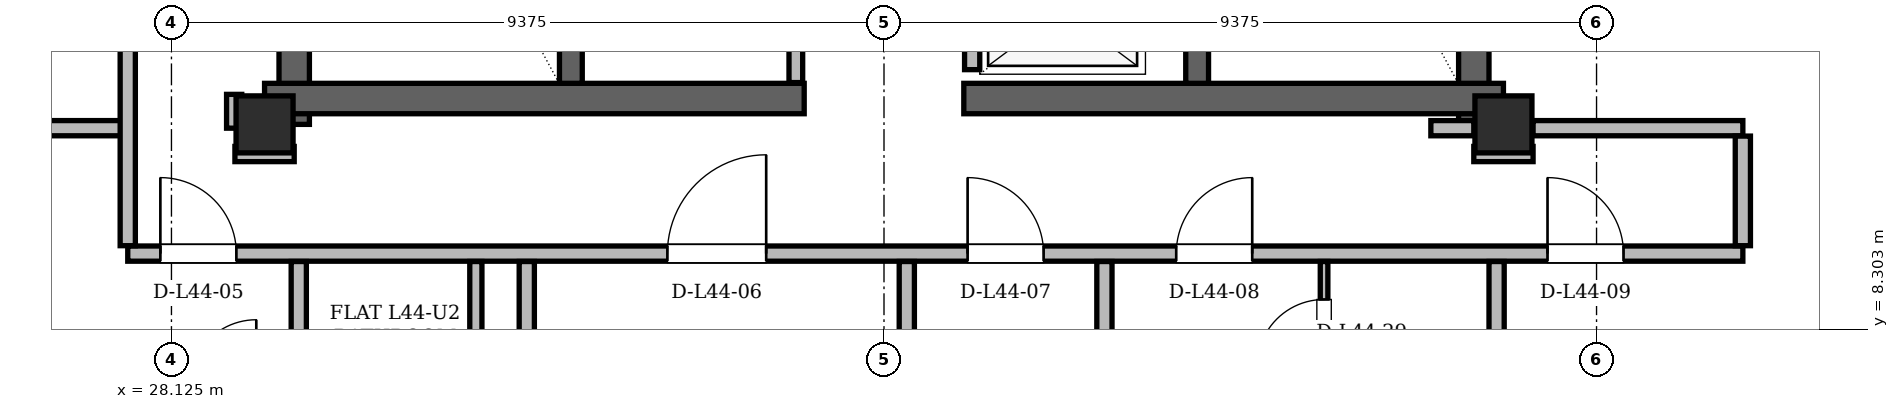
"""IFC4 building model, lengths in metres.
Left out: names, types, materials, properties, quantities, classifications, styles, units other than length and angle.
Written with IfcOpenShell. Run it as: python <this file> out.ifc"""

import sys

from ifc_helpers import new_model, si_unit, direction, frame, frame_2d, origin, origin_2d, place, context, subcontext, project, spatial, rectangle, hollow_rectangle, extrude, element, fill, save


model = new_model("IFC4")
c1 = context("Model", 3, precision=1e-05, world=origin(), true_north=direction((0.0, 1.0)))
c2 = subcontext(c1, "Body", "Model", "MODEL_VIEW")
j1 = project(units=[si_unit("LENGTHUNIT", "METRE"), si_unit("PLANEANGLEUNIT", "RADIAN")], contexts=[c1])
p1 = place(None, origin())
s1 = spatial("IfcSite", under=j1, at=p1, CompositionType="ELEMENT")
p2 = place(p1, origin())
s2 = spatial("IfcBuilding", under=s1, at=p2, CompositionType="ELEMENT")
p3 = place(p2, frame((0.0, 0.0, 167.4)))
s3 = spatial("IfcBuildingStorey", under=s2, at=p3, CompositionType="ELEMENT", Elevation=167.4)
for number, where, z_axis, x_axis in (
    (1, (29.35, 11.0, 0.0), (0.0, 0.0, 1.0), (1.0, 0.0, 0.0)),
    (2, (45.65, 11.0, 0.0), (0.0, 0.0, 1.0), (1.0, 0.0, 0.0)),
):
    element("IfcColumn", number, at=place(p3, frame(where, z_axis=z_axis, x_axis=x_axis)), inside=s3, PredefinedType="COLUMN", context=c2, shape_type="SweptSolid", body=[
        extrude(hollow_rectangle(XDim=0.75, YDim=0.75, WallThickness=0.06, at=origin_2d()), origin(), (0.0, 0.0, 1.0), 3.6),
    ])
for number, where, z_axis, x_axis in (
    (3, (29.74, 11.0, 0.0), (0.0, 0.0, 1.0), (0.0, 1.0, 0.0)),
    (4, (45.26, 11.0, 0.0), (0.0, 0.0, 1.0), (0.0, 1.0, 0.0)),
):
    element("IfcWall", number, at=place(p3, frame(where, z_axis=z_axis, x_axis=x_axis)), inside=s3, PredefinedType="SHEAR", context=c2, shape_type="SweptSolid", body=[
        extrude(rectangle(XDim=13.3, YDim=0.4, at=frame_2d((6.65, 0.0))), origin(), (0.0, 0.0, 1.0), 3.38),
    ])
for number, where, z_axis, x_axis in (
    (5, (29.35, 11.34, 0.0), (0.0, 0.0, 1.0), (1.0, 0.0, 0.0)),
    (6, (38.55, 11.34, 0.0), (0.0, 0.0, 1.0), (1.0, 0.0, 0.0)),
):
    element("IfcWall", number, at=place(p3, frame(where, z_axis=z_axis, x_axis=x_axis)), inside=s3, PredefinedType="SHEAR", context=c2, shape_type="SweptSolid", body=[
        extrude(rectangle(XDim=7.1, YDim=0.4, at=frame_2d((3.55, 0.0))), origin(), (0.0, 0.0, 1.0), 3.38),
    ])
for number, where, z_axis, x_axis in (
    (7, (33.38, 11.54, 0.0), (0.0, 0.0, 1.0), (0.0, 1.0, 0.0)),
    (8, (41.62, 11.54, 0.0), (0.0, 0.0, 1.0), (0.0, 1.0, 0.0)),
):
    element("IfcWall", number, at=place(p3, frame(where, z_axis=z_axis, x_axis=x_axis)), inside=s3, PredefinedType="SHEAR", context=c2, shape_type="SweptSolid", body=[
        extrude(rectangle(XDim=7.62, YDim=0.3, at=frame_2d((3.81, 0.0))), origin(), (0.0, 0.0, 1.0), 3.38),
    ])
p4 = place(p3, frame((36.34, 11.55, 0.0), z_axis=(0.0, 0.0, 1.0), x_axis=(0.0, 1.0, 0.0)))
e9 = element("IfcWall", 9, at=p4, inside=s3, PredefinedType="PARTITIONING", context=c2, shape_type="SweptSolid", body=[
    extrude(rectangle(XDim=5.55, YDim=0.18, at=frame_2d((2.775, 0.0))), origin(), (0.0, 0.0, 1.0), 3.38),
])
p5 = place(p4, frame((2.85, 0.0, 0.0)))
e10 = element("IfcOpeningElement", 10, at=p5, cuts=e9, PredefinedType="OPENING", context=c2, shape_type="SweptSolid", body=[
    extrude(rectangle(XDim=0.95, YDim=2.1, at=frame_2d((0.475, 1.05))), frame((0.0, 0.09, 0.0), z_axis=(0.0, -1.0, 0.0), x_axis=(1.0, 0.0, 0.0)), (0.0, 0.0, 1.0), 0.18),
])
p6 = place(p3, frame((38.66, 11.72, 0.0), z_axis=(0.0, 0.0, 1.0), x_axis=(0.0, 1.0, 0.0)))
e11 = element("IfcWall", 11, at=p6, inside=s3, PredefinedType="PARTITIONING", context=c2, shape_type="SweptSolid", body=[
    extrude(rectangle(XDim=9.1, YDim=0.2, at=frame_2d((4.55, 0.0))), origin(), (0.0, 0.0, 1.0), 3.38),
])
p7 = place(p6, frame((0.255, 0.0, 0.0)))
e12 = element("IfcOpeningElement", 12, at=p7, cuts=e11, PredefinedType="OPENING", context=c2, shape_type="SweptSolid", body=[
    extrude(rectangle(XDim=1.05, YDim=2.15, at=frame_2d((0.525, 1.075))), frame((0.0, 0.1, 0.0), z_axis=(0.0, -1.0, 0.0), x_axis=(1.0, 0.0, 0.0)), (0.0, 0.0, 1.0), 0.2),
])
p8 = place(p6, frame((2.105, 0.0, 0.0)))
e13 = element("IfcOpeningElement", 13, at=p8, cuts=e11, PredefinedType="OPENING", context=c2, shape_type="SweptSolid", body=[
    extrude(rectangle(XDim=1.05, YDim=2.15, at=frame_2d((0.525, 1.075))), frame((0.0, 0.1, 0.0), z_axis=(0.0, -1.0, 0.0), x_axis=(1.0, 0.0, 0.0)), (0.0, 0.0, 1.0), 0.2),
])
p9 = place(p6, frame((3.955, 0.0, 0.0)))
e14 = element("IfcOpeningElement", 14, at=p9, cuts=e11, PredefinedType="OPENING", context=c2, shape_type="SweptSolid", body=[
    extrude(rectangle(XDim=1.05, YDim=2.15, at=frame_2d((0.525, 1.075))), frame((0.0, 0.1, 0.0), z_axis=(0.0, -1.0, 0.0), x_axis=(1.0, 0.0, 0.0)), (0.0, 0.0, 1.0), 0.2),
])
p10 = place(p3, frame((27.55, 9.3, 0.0), z_axis=(0.0, 0.0, 1.0), x_axis=(1.0, 0.0, 0.0)))
e15 = element("IfcWall", 15, at=p10, inside=s3, PredefinedType="PARTITIONING", context=c2, shape_type="SweptSolid", body=[
    extrude(rectangle(XDim=21.25, YDim=0.2, at=frame_2d((10.625, 0.0))), origin(), (0.0, 0.0, 1.0), 2.842),
])
p11 = place(p10, frame((0.429, 0.0, 0.0)))
e16 = element("IfcOpeningElement", 16, at=p11, cuts=e15, PredefinedType="OPENING", context=c2, shape_type="SweptSolid", body=[
    extrude(rectangle(XDim=1.0, YDim=2.18, at=frame_2d((0.5, 1.09))), frame((0.0, 0.1, 0.0), z_axis=(0.0, -1.0, 0.0), x_axis=(1.0, 0.0, 0.0)), (0.0, 0.0, 1.0), 0.2),
])
p12 = place(p10, frame((7.1, 0.0, 0.0)))
e17 = element("IfcOpeningElement", 17, at=p12, cuts=e15, PredefinedType="OPENING", context=c2, shape_type="SweptSolid", body=[
    extrude(rectangle(XDim=1.3, YDim=2.2, at=frame_2d((0.65, 1.1))), frame((0.0, 0.1, 0.0), z_axis=(0.0, -1.0, 0.0), x_axis=(1.0, 0.0, 0.0)), (0.0, 0.0, 1.0), 0.2),
])
p13 = place(p10, frame((11.05, 0.0, 0.0)))
e18 = element("IfcOpeningElement", 18, at=p13, cuts=e15, PredefinedType="OPENING", context=c2, shape_type="SweptSolid", body=[
    extrude(rectangle(XDim=1.0, YDim=2.18, at=frame_2d((0.5, 1.09))), frame((0.0, 0.1, 0.0), z_axis=(0.0, -1.0, 0.0), x_axis=(1.0, 0.0, 0.0)), (0.0, 0.0, 1.0), 0.2),
])
p14 = place(p10, frame((13.795, 0.0, 0.0)))
e19 = element("IfcOpeningElement", 19, at=p14, cuts=e15, PredefinedType="OPENING", context=c2, shape_type="SweptSolid", body=[
    extrude(rectangle(XDim=1.0, YDim=2.18, at=frame_2d((0.5, 1.09))), frame((0.0, 0.1, 0.0), z_axis=(0.0, -1.0, 0.0), x_axis=(1.0, 0.0, 0.0)), (0.0, 0.0, 1.0), 0.2),
])
p15 = place(p10, frame((18.68, 0.0, 0.0)))
e20 = element("IfcOpeningElement", 20, at=p15, cuts=e15, PredefinedType="OPENING", context=c2, shape_type="SweptSolid", body=[
    extrude(rectangle(XDim=1.0, YDim=2.18, at=frame_2d((0.5, 1.09))), frame((0.0, 0.1, 0.0), z_axis=(0.0, -1.0, 0.0), x_axis=(1.0, 0.0, 0.0)), (0.0, 0.0, 1.0), 0.2),
])
for number, where, z_axis, x_axis in (
    (21, (28.96, 10.61, 0.0), (0.0, 0.0, 1.0), (1.0, 0.0, 0.0)),
    (22, (45.26, 10.61, 0.0), (0.0, 0.0, 1.0), (1.0, 0.0, 0.0)),
):
    element("IfcWall", number, at=place(p3, frame(where, z_axis=z_axis, x_axis=x_axis)), inside=s3, PredefinedType="PARTITIONING", context=c2, shape_type="SweptSolid", body=[
        extrude(rectangle(XDim=0.78, YDim=0.2, at=frame_2d((0.39, 0.0))), origin(), (0.0, 0.0, 1.0), 3.38),
    ])
p16 = place(p3, frame((16.184, 10.95, 0.0), z_axis=(0.0, 0.0, 1.0), x_axis=(1.0, 0.0, 0.0)))
e23 = element("IfcWall", 23, at=p16, inside=s3, PredefinedType="PARTITIONING", context=c2, shape_type="SweptSolid", body=[
    extrude(rectangle(XDim=11.366, YDim=0.2, at=frame_2d((5.683, 0.0))), origin(), (0.0, 0.0, 1.0), 3.38),
])
p17 = place(p3, frame((44.695, 10.95, 0.0), z_axis=(0.0, 0.0, 1.0), x_axis=(1.0, 0.0, 0.0)))
e24 = element("IfcWall", 24, at=p17, inside=s3, PredefinedType="PARTITIONING", context=c2, shape_type="SweptSolid", body=[
    extrude(rectangle(XDim=0.565, YDim=0.2, at=frame_2d((0.282, 0.0))), origin(), (0.0, 0.0, 1.0), 2.52),
])
p18 = place(p3, frame((46.04, 10.95, 0.0), z_axis=(0.0, 0.0, 1.0), x_axis=(1.0, 0.0, 0.0)))
e25 = element("IfcWall", 25, at=p18, inside=s3, PredefinedType="PARTITIONING", context=c2, shape_type="SweptSolid", body=[
    extrude(rectangle(XDim=2.76, YDim=0.2, at=frame_2d((1.38, 0.0))), origin(), (0.0, 0.0, 1.0), 2.842),
])
p19 = place(p3, frame((27.55, 9.404, 0.0), z_axis=(0.0, 0.0, 1.0), x_axis=(0.0, 1.0, 0.0)))
e26 = element("IfcWall", 26, at=p19, inside=s3, PredefinedType="PARTITIONING", context=c2, shape_type="SweptSolid", body=[
    extrude(rectangle(XDim=7.342, YDim=0.2, at=frame_2d((3.671, 0.0))), origin(), (0.0, 0.0, 1.0), 2.842),
])
p20 = place(p19, frame((2.719, 0.0, 0.0)))
e27 = element("IfcOpeningElement", 27, at=p20, cuts=e26, PredefinedType="OPENING", context=c2, shape_type="SweptSolid", body=[
    extrude(rectangle(XDim=1.0, YDim=2.18, at=frame_2d((0.5, 1.09))), frame((0.0, 0.1, 0.0), z_axis=(0.0, -1.0, 0.0), x_axis=(1.0, 0.0, 0.0)), (0.0, 0.0, 1.0), 0.2),
])
p21 = place(p3, frame((28.95, 10.95, 0.0), z_axis=(0.0, 0.0, 1.0), x_axis=(0.0, 1.0, 0.0)))
e28 = element("IfcWall", 28, at=p21, inside=s3, PredefinedType="PARTITIONING", context=c2, shape_type="SweptSolid", body=[
    extrude(rectangle(XDim=0.445, YDim=0.2, at=frame_2d((0.223, 0.0))), origin(), (0.0, 0.0, 1.0), 2.842),
])
p22 = place(p3, frame((29.8, 4.885, 0.0), z_axis=(0.0, 0.0, 1.0), x_axis=(0.0, 1.0, 0.0)))
e29 = element("IfcWall", 29, at=p22, inside=s3, PredefinedType="PARTITIONING", context=c2, shape_type="SweptSolid", body=[
    extrude(rectangle(XDim=4.311, YDim=0.2, at=frame_2d((2.155, 0.0))), origin(), (0.0, 0.0, 1.0), 3.38),
])
p23 = place(p3, frame((32.13, 4.885, 0.0), z_axis=(0.0, 0.0, 1.0), x_axis=(0.0, 1.0, 0.0)))
e30 = element("IfcWall", 30, at=p23, inside=s3, PredefinedType="PARTITIONING", context=c2, shape_type="SweptSolid", body=[
    extrude(rectangle(XDim=4.311, YDim=0.16, at=frame_2d((2.155, 0.0))), origin(), (0.0, 0.0, 1.0), 2.966),
])
p24 = place(p23, frame((1.768, 0.0, 0.0)))
e31 = element("IfcOpeningElement", 31, at=p24, cuts=e30, PredefinedType="OPENING", context=c2, shape_type="SweptSolid", body=[
    extrude(rectangle(XDim=0.88, YDim=2.08, at=frame_2d((0.44, 1.04))), frame((0.0, 0.08, 0.0), z_axis=(0.0, -1.0, 0.0), x_axis=(1.0, 0.0, 0.0)), (0.0, 0.0, 1.0), 0.16),
])
p25 = place(p3, frame((32.8, 5.104, 0.0), z_axis=(0.0, 0.0, 1.0), x_axis=(0.0, 1.0, 0.0)))
e32 = element("IfcWall", 32, at=p25, inside=s3, PredefinedType="PARTITIONING", context=c2, shape_type="SweptSolid", body=[
    extrude(rectangle(XDim=4.092, YDim=0.2, at=frame_2d((2.046, 0.0))), origin(), (0.0, 0.0, 1.0), 2.966),
])
p26 = place(p3, frame((37.8, 5.104, 0.0), z_axis=(0.0, 0.0, 1.0), x_axis=(0.0, 1.0, 0.0)))
e33 = element("IfcWall", 33, at=p26, inside=s3, PredefinedType="PARTITIONING", context=c2, shape_type="SweptSolid", body=[
    extrude(rectangle(XDim=4.092, YDim=0.2, at=frame_2d((2.046, 0.0))), origin(), (0.0, 0.0, 1.0), 3.38),
])
p27 = place(p3, frame((40.4, 4.885, 0.0), z_axis=(0.0, 0.0, 1.0), x_axis=(0.0, 1.0, 0.0)))
e34 = element("IfcWall", 34, at=p27, inside=s3, PredefinedType="PARTITIONING", context=c2, shape_type="SweptSolid", body=[
    extrude(rectangle(XDim=4.311, YDim=0.2, at=frame_2d((2.155, 0.0))), origin(), (0.0, 0.0, 1.0), 3.38),
])
p28 = place(p3, frame((43.29, 4.885, 0.0), z_axis=(0.0, 0.0, 1.0), x_axis=(0.0, 1.0, 0.0)))
e35 = element("IfcWall", 35, at=p28, inside=s3, PredefinedType="PARTITIONING", context=c2, shape_type="SweptSolid", body=[
    extrude(rectangle(XDim=4.311, YDim=0.1, at=frame_2d((2.155, 0.0))), origin(), (0.0, 0.0, 1.0), 2.966),
])
p29 = place(p28, frame((0.659, 0.0, 0.0)))
e36 = element("IfcOpeningElement", 36, at=p29, cuts=e35, PredefinedType="OPENING", context=c2, shape_type="SweptSolid", body=[
    extrude(rectangle(XDim=0.95, YDim=2.1, at=frame_2d((0.475, 1.05))), frame((0.0, 0.05, 0.0), z_axis=(0.0, -1.0, 0.0), x_axis=(1.0, 0.0, 0.0)), (0.0, 0.0, 1.0), 0.1),
])
p30 = place(p28, frame((2.931, 0.0, 0.0)))
e37 = element("IfcOpeningElement", 37, at=p30, cuts=e35, PredefinedType="OPENING", context=c2, shape_type="SweptSolid", body=[
    extrude(rectangle(XDim=0.88, YDim=2.08, at=frame_2d((0.44, 1.04))), frame((0.0, 0.05, 0.0), z_axis=(0.0, -1.0, 0.0), x_axis=(1.0, 0.0, 0.0)), (0.0, 0.0, 1.0), 0.1),
])
p31 = place(p3, frame((45.56, 4.885, 0.0), z_axis=(0.0, 0.0, 1.0), x_axis=(0.0, 1.0, 0.0)))
e38 = element("IfcWall", 38, at=p31, inside=s3, PredefinedType="PARTITIONING", context=c2, shape_type="SweptSolid", body=[
    extrude(rectangle(XDim=4.311, YDim=0.2, at=frame_2d((2.155, 0.0))), origin(), (0.0, 0.0, 1.0), 2.966),
])
p32 = place(p3, frame((48.8, 9.404, 0.0), z_axis=(0.0, 0.0, 1.0), x_axis=(0.0, 1.0, 0.0)))
e39 = element("IfcWall", 39, at=p32, inside=s3, PredefinedType="PARTITIONING", context=c2, shape_type="SweptSolid", body=[
    extrude(rectangle(XDim=1.442, YDim=0.2, at=frame_2d((0.721, 0.0))), origin(), (0.0, 0.0, 1.0), 3.38),
])
p33 = place(p11, origin())
e40 = element("IfcDoor", 40, at=p33, inside=s3, OperationType="SINGLE_SWING_LEFT", PredefinedType="DOOR", context=c2, shape_type="SweptSolid", body=[
    extrude(rectangle(XDim=1.0, YDim=2.18, at=frame_2d((0.5, 1.09))), frame((0.0, 0.025, 0.0), z_axis=(0.0, -1.0, 0.0), x_axis=(1.0, 0.0, 0.0)), (0.0, 0.0, 1.0), 0.05),
])
fill(e16, e40)
p34 = place(p12, origin())
e41 = element("IfcDoor", 41, at=p34, inside=s3, OperationType="SINGLE_SWING_RIGHT", PredefinedType="DOOR", context=c2, shape_type="SweptSolid", body=[
    extrude(rectangle(XDim=1.3, YDim=2.2, at=frame_2d((0.65, 1.1))), frame((0.0, 0.025, 0.0), z_axis=(0.0, -1.0, 0.0), x_axis=(1.0, 0.0, 0.0)), (0.0, 0.0, 1.0), 0.05),
])
fill(e17, e41)
p35 = place(p13, origin())
e42 = element("IfcDoor", 42, at=p35, inside=s3, OperationType="SINGLE_SWING_LEFT", PredefinedType="DOOR", context=c2, shape_type="SweptSolid", body=[
    extrude(rectangle(XDim=1.0, YDim=2.18, at=frame_2d((0.5, 1.09))), frame((0.0, 0.025, 0.0), z_axis=(0.0, -1.0, 0.0), x_axis=(1.0, 0.0, 0.0)), (0.0, 0.0, 1.0), 0.05),
])
fill(e18, e42)
p36 = place(p14, origin())
e43 = element("IfcDoor", 43, at=p36, inside=s3, OperationType="SINGLE_SWING_RIGHT", PredefinedType="DOOR", context=c2, shape_type="SweptSolid", body=[
    extrude(rectangle(XDim=1.0, YDim=2.18, at=frame_2d((0.5, 1.09))), frame((0.0, 0.025, 0.0), z_axis=(0.0, -1.0, 0.0), x_axis=(1.0, 0.0, 0.0)), (0.0, 0.0, 1.0), 0.05),
])
fill(e19, e43)
p37 = place(p15, origin())
e44 = element("IfcDoor", 44, at=p37, inside=s3, OperationType="SINGLE_SWING_LEFT", PredefinedType="DOOR", context=c2, shape_type="SweptSolid", body=[
    extrude(rectangle(XDim=1.0, YDim=2.18, at=frame_2d((0.5, 1.09))), frame((0.0, 0.025, 0.0), z_axis=(0.0, -1.0, 0.0), x_axis=(1.0, 0.0, 0.0)), (0.0, 0.0, 1.0), 0.05),
])
fill(e20, e44)
p38 = place(p30, origin())
e45 = element("IfcDoor", 45, at=p38, inside=s3, OperationType="SINGLE_SWING_LEFT", PredefinedType="DOOR", context=c2, shape_type="SweptSolid", body=[
    extrude(rectangle(XDim=0.88, YDim=2.08, at=frame_2d((0.44, 1.04))), frame((0.0, 0.025, 0.0), z_axis=(0.0, -1.0, 0.0), x_axis=(1.0, 0.0, 0.0)), (0.0, 0.0, 1.0), 0.05),
])
fill(e37, e45)
save(model, sys.argv[1])
